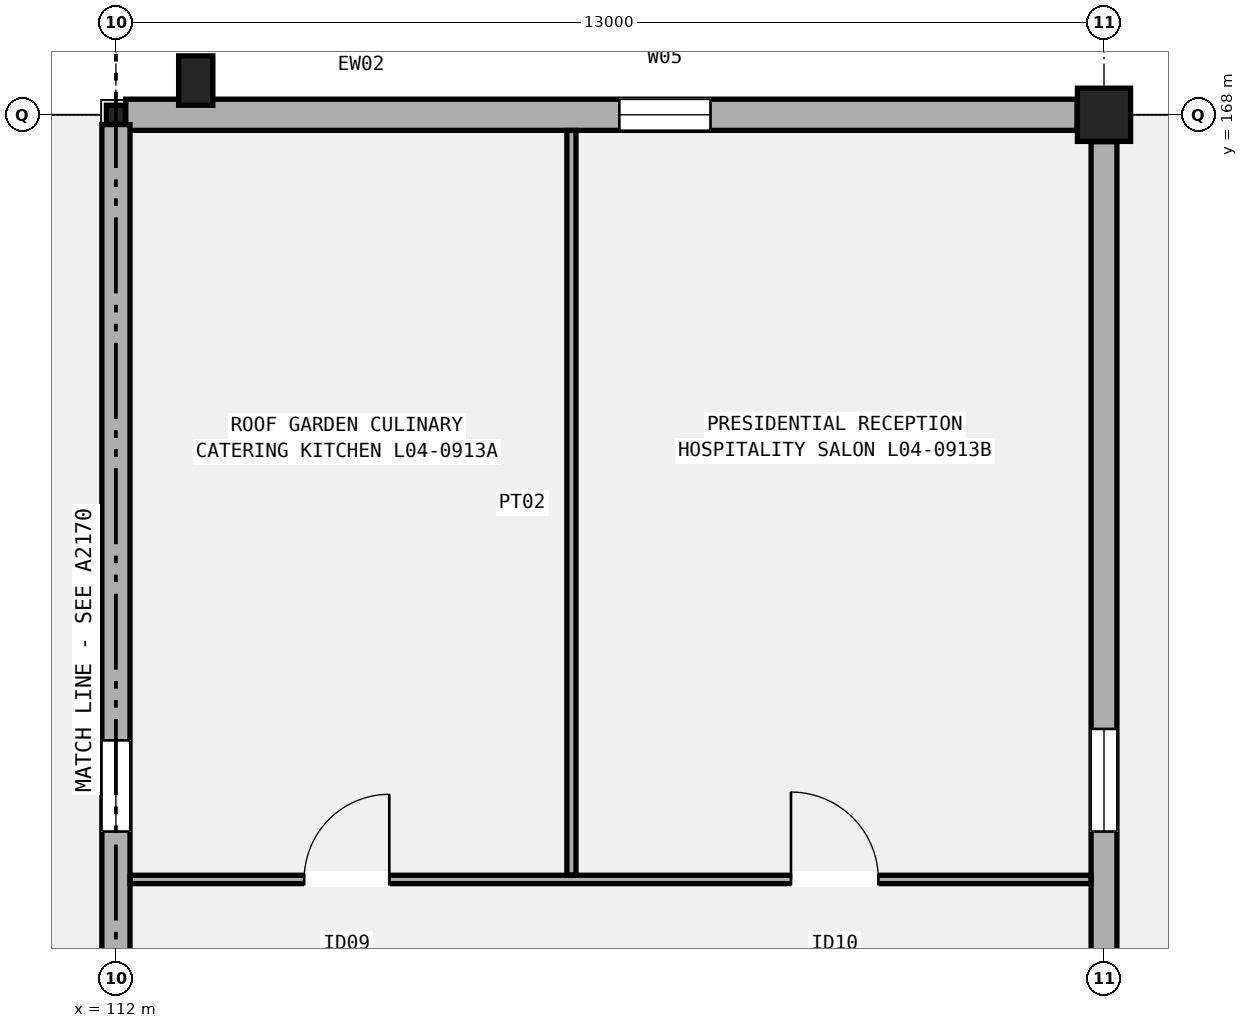
"""IFC4 building model, lengths in metres.
Left out: names, types, materials, properties, quantities, classifications, styles, units other than length and angle.
Written with IfcOpenShell. Run it as: python <this file> out.ifc"""

import sys

from ifc_helpers import new_model, si_unit, direction, frame, frame_2d, origin, origin_2d, place, context, subcontext, project, spatial, rectangle, hollow_rectangle, extrude, element, fill, save


model = new_model("IFC4")
c1 = context("Model", 3, precision=1e-05, world=origin(), true_north=direction((0.0, 1.0)))
c2 = subcontext(c1, "Body", "Model", "MODEL_VIEW")
j1 = project(units=[si_unit("LENGTHUNIT", "METRE"), si_unit("PLANEANGLEUNIT", "RADIAN")], contexts=[c1])
p1 = place(None, origin())
s1 = spatial("IfcSite", under=j1, at=p1, CompositionType="ELEMENT")
p2 = place(p1, origin())
s2 = spatial("IfcBuilding", under=s1, at=p2, CompositionType="ELEMENT")
p3 = place(p2, frame((0.0, 0.0, 20.4)))
s3 = spatial("IfcBuildingStorey", under=s2, at=p3, CompositionType="ELEMENT", Elevation=20.4)
p4 = place(p3, frame((112.0, 168.0, 0.0), z_axis=(0.0, 0.0, 1.0), x_axis=(1.0, 0.0, 0.0)))
e1 = element("IfcColumn", 1, at=p4, inside=s3, PredefinedType="COLUMN", context=c2, shape_type="SweptSolid", body=[
    extrude(hollow_rectangle(XDim=0.25, YDim=0.25, WallThickness=0.012, InnerFilletRadius=0.012, OuterFilletRadius=0.024, at=origin_2d()), origin(), (0.0, 0.0, 1.0), 5.4),
])
p5 = place(p3, frame((125.0, 168.0, 0.0), z_axis=(0.0, 0.0, 1.0), x_axis=(1.0, 0.0, 0.0)))
e2 = element("IfcColumn", 2, at=p5, inside=s3, PredefinedType="COLUMN", context=c2, shape_type="SweptSolid", body=[
    extrude(rectangle(XDim=0.7, YDim=0.7, at=origin_2d()), origin(), (0.0, 0.0, 1.0), 5.4),
])
p6 = place(p3, frame((113.05, 168.45, 0.0), z_axis=(0.0, 0.0, 1.0), x_axis=(1.0, 0.0, 0.0)))
e3 = element("IfcColumn", 3, at=p6, inside=s3, PredefinedType="PILASTER", context=c2, shape_type="SweptSolid", body=[
    extrude(rectangle(XDim=0.45, YDim=0.65, at=origin_2d()), origin(), (0.0, 0.0, 1.0), 5.4),
])
p7 = place(p3, frame((112.129, 168.0, 0.0), z_axis=(0.0, 0.0, 1.0), x_axis=(1.0, 0.0, 0.0)))
e4 = element("IfcWall", 4, at=p7, inside=s3, PredefinedType="SOLIDWALL", context=c2, shape_type="SweptSolid", body=[
    extrude(rectangle(XDim=12.517, YDim=0.41, at=frame_2d((6.259, 0.0))), origin(), (0.0, 0.0, 1.0), 4.592),
])
p8 = place(p7, frame((6.494, 0.0, 0.95)))
e5 = element("IfcOpeningElement", 5, at=p8, cuts=e4, PredefinedType="OPENING", context=c2, shape_type="SweptSolid", body=[
    extrude(rectangle(XDim=1.2, YDim=1.9, at=frame_2d((0.6, 0.95))), frame((0.0, 0.215, 0.0), z_axis=(0.0, -1.0, 0.0), x_axis=(1.0, 0.0, 0.0)), (0.0, 0.0, 1.0), 0.43),
])
p9 = place(p3, frame((112.0, 156.154, 0.0), z_axis=(0.0, 0.0, 1.0), x_axis=(0.0, 1.0, 0.0)))
e6 = element("IfcWall", 6, at=p9, inside=s3, PredefinedType="SOLIDWALL", context=c2, shape_type="SweptSolid", body=[
    extrude(rectangle(XDim=11.717, YDim=0.37, at=frame_2d((5.858, 0.0))), origin(), (0.0, 0.0, 1.0), 4.58),
])
p10 = place(p9, frame((2.416, 0.0, 0.95)))
e7 = element("IfcOpeningElement", 7, at=p10, cuts=e6, PredefinedType="OPENING", context=c2, shape_type="SweptSolid", body=[
    extrude(rectangle(XDim=1.2, YDim=2.3, at=frame_2d((0.6, 1.15))), frame((0.0, 0.195, 0.0), z_axis=(0.0, -1.0, 0.0), x_axis=(1.0, 0.0, 0.0)), (0.0, 0.0, 1.0), 0.39),
])
p11 = place(p3, frame((125.0, 156.129, 0.0), z_axis=(0.0, 0.0, 1.0), x_axis=(0.0, 1.0, 0.0)))
e8 = element("IfcWall", 8, at=p11, inside=s3, PredefinedType="SOLIDWALL", context=c2, shape_type="SweptSolid", body=[
    extrude(rectangle(XDim=11.517, YDim=0.34, at=frame_2d((5.759, 0.0))), origin(), (0.0, 0.0, 1.0), 4.592),
])
p12 = place(p11, frame((2.441, 0.0, 0.95)))
e9 = element("IfcOpeningElement", 9, at=p12, cuts=e8, PredefinedType="OPENING", context=c2, shape_type="SweptSolid", body=[
    extrude(rectangle(XDim=1.35, YDim=2.0, at=frame_2d((0.675, 1.0))), frame((0.0, 0.18, 0.0), z_axis=(0.0, -1.0, 0.0), x_axis=(1.0, 0.0, 0.0)), (0.0, 0.0, 1.0), 0.36),
])
p13 = place(p3, frame((112.187, 157.94, 0.0), z_axis=(0.0, 0.0, 1.0), x_axis=(1.0, 0.0, 0.0)))
e10 = element("IfcWall", 10, at=p13, inside=s3, PredefinedType="PARTITIONING", context=c2, shape_type="SweptSolid", body=[
    extrude(rectangle(XDim=12.641, YDim=0.11, at=frame_2d((6.32, 0.0))), origin(), (0.0, 0.0, 1.0), 4.52),
])
p14 = place(p13, frame((2.289, 0.0, 0.0)))
e11 = element("IfcOpeningElement", 11, at=p14, cuts=e10, PredefinedType="OPENING", context=c2, shape_type="SweptSolid", body=[
    extrude(rectangle(XDim=1.12, YDim=2.18, at=frame_2d((0.56, 1.09))), frame((0.0, 0.065, 0.0), z_axis=(0.0, -1.0, 0.0), x_axis=(1.0, 0.0, 0.0)), (0.0, 0.0, 1.0), 0.13),
])
p15 = place(p13, frame((8.694, 0.0, 0.0)))
e12 = element("IfcOpeningElement", 12, at=p15, cuts=e10, PredefinedType="OPENING", context=c2, shape_type="SweptSolid", body=[
    extrude(rectangle(XDim=1.15, YDim=2.15, at=frame_2d((0.575, 1.075))), frame((0.0, 0.065, 0.0), z_axis=(0.0, -1.0, 0.0), x_axis=(1.0, 0.0, 0.0)), (0.0, 0.0, 1.0), 0.13),
])
p16 = place(p3, frame((117.993, 158.0, 0.0), z_axis=(0.0, 0.0, 1.0), x_axis=(0.0, 1.0, 0.0)))
e13 = element("IfcWall", 13, at=p16, inside=s3, PredefinedType="PARTITIONING", context=c2, shape_type="SweptSolid", body=[
    extrude(rectangle(XDim=9.793, YDim=0.12, at=frame_2d((4.896, 0.0))), origin(), (0.0, 0.0, 1.0), 4.52),
])
p17 = place(p8, origin())
e14 = element("IfcWindow", 14, at=p17, inside=s3, PartitioningType="SINGLE_PANEL", PredefinedType="WINDOW", context=c2, shape_type="SweptSolid", body=[
    extrude(rectangle(XDim=1.2, YDim=1.9, at=frame_2d((0.6, 0.95))), frame((0.0, 0.03, 0.0), z_axis=(0.0, -1.0, 0.0), x_axis=(1.0, 0.0, 0.0)), (0.0, 0.0, 1.0), 0.06),
])
fill(e5, e14)
p18 = place(p10, origin())
e15 = element("IfcWindow", 15, at=p18, inside=s3, PartitioningType="SINGLE_PANEL", PredefinedType="WINDOW", context=c2, shape_type="SweptSolid", body=[
    extrude(rectangle(XDim=1.2, YDim=2.3, at=frame_2d((0.6, 1.15))), frame((0.0, 0.03, 0.0), z_axis=(0.0, -1.0, 0.0), x_axis=(1.0, 0.0, 0.0)), (0.0, 0.0, 1.0), 0.06),
])
fill(e7, e15)
p19 = place(p12, origin())
e16 = element("IfcWindow", 16, at=p19, inside=s3, PartitioningType="SINGLE_PANEL", PredefinedType="WINDOW", context=c2, shape_type="SweptSolid", body=[
    extrude(rectangle(XDim=1.35, YDim=2.0, at=frame_2d((0.675, 1.0))), frame((0.0, 0.03, 0.0), z_axis=(0.0, -1.0, 0.0), x_axis=(1.0, 0.0, 0.0)), (0.0, 0.0, 1.0), 0.06),
])
fill(e9, e16)
p20 = place(p14, origin())
e17 = element("IfcDoor", 17, at=p20, inside=s3, OperationType="SINGLE_SWING_RIGHT", PredefinedType="DOOR", context=c2, shape_type="SweptSolid", body=[
    extrude(rectangle(XDim=1.12, YDim=2.18, at=frame_2d((0.56, 1.09))), frame((0.0, 0.025, 0.0), z_axis=(0.0, -1.0, 0.0), x_axis=(1.0, 0.0, 0.0)), (0.0, 0.0, 1.0), 0.05),
])
fill(e11, e17)
p21 = place(p15, origin())
e18 = element("IfcDoor", 18, at=p21, inside=s3, OperationType="SINGLE_SWING_LEFT", PredefinedType="DOOR", context=c2, shape_type="SweptSolid", body=[
    extrude(rectangle(XDim=1.15, YDim=2.15, at=frame_2d((0.575, 1.075))), frame((0.0, 0.025, 0.0), z_axis=(0.0, -1.0, 0.0), x_axis=(1.0, 0.0, 0.0)), (0.0, 0.0, 1.0), 0.05),
])
fill(e12, e18)
save(model, sys.argv[1])
